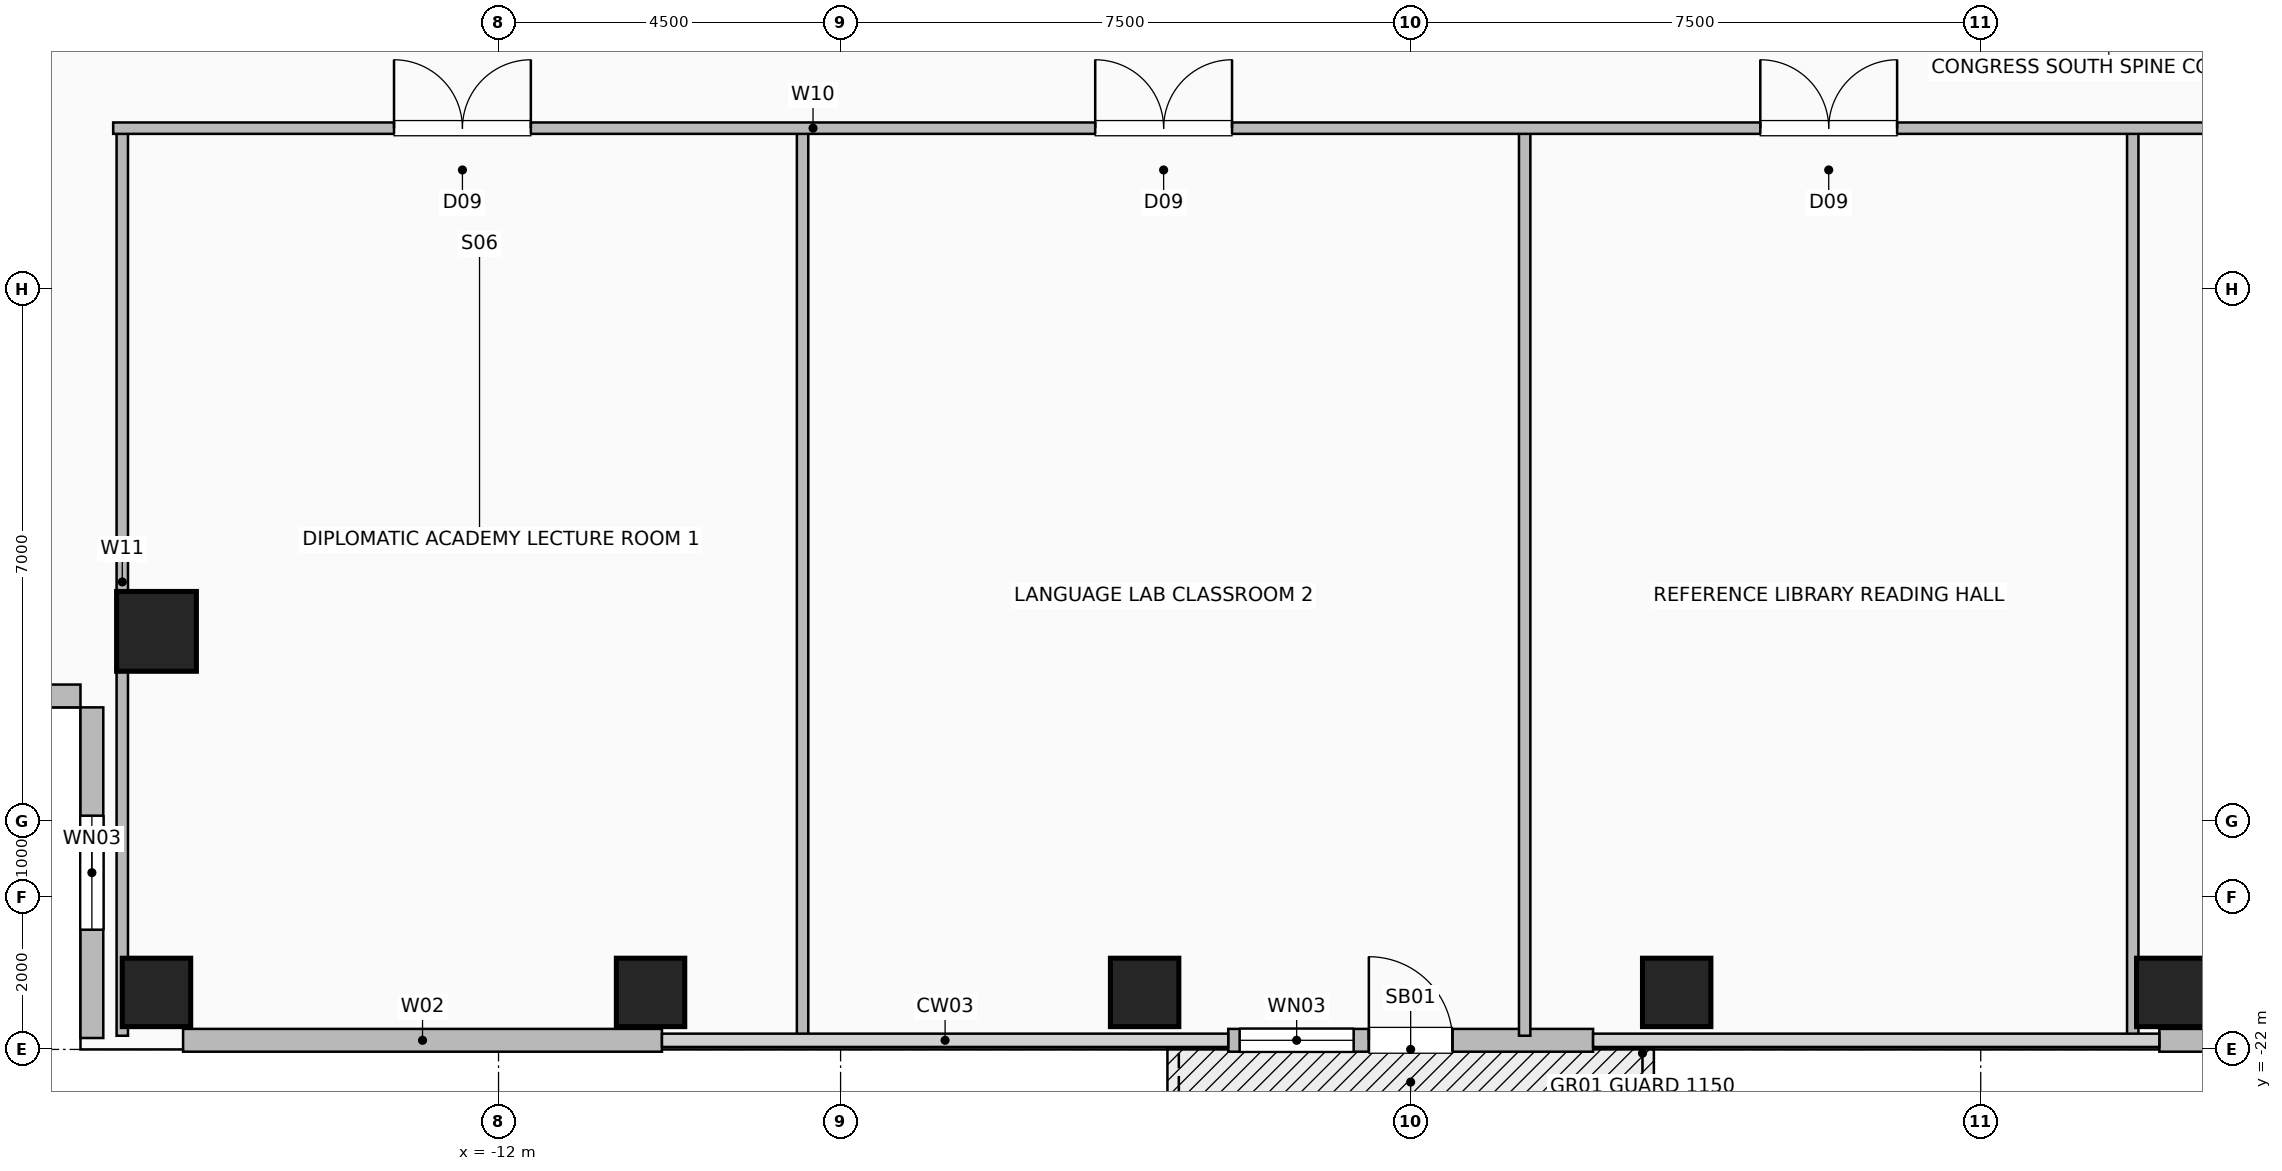
"""IFC4 building model, lengths in metres.
Left out: names, types, materials, properties, quantities, classifications, styles, units other than length and angle.
Written with IfcOpenShell. Run it as: python <this file> out.ifc"""

import sys

from ifc_helpers import new_model, si_unit, direction, frame, frame_2d, origin, origin_2d, place, context, subcontext, project, spatial, rectangle, hollow_rectangle, extrude, element, fill, save


model = new_model("IFC4")
c1 = context("Model", 3, precision=1e-05, world=origin(), true_north=direction((0.0, 1.0)))
c2 = subcontext(c1, "Body", "Model", "MODEL_VIEW")
j1 = project(units=[si_unit("LENGTHUNIT", "METRE"), si_unit("PLANEANGLEUNIT", "RADIAN")], contexts=[c1])
p1 = place(None, origin())
s1 = spatial("IfcSite", under=j1, at=p1, CompositionType="ELEMENT")
p2 = place(p1, origin())
s2 = spatial("IfcBuilding", under=s1, at=p2, CompositionType="ELEMENT")
p3 = place(p2, frame((0.0, 0.0, 133.6)))
s3 = spatial("IfcBuildingStorey", under=s2, at=p3, CompositionType="ELEMENT", Elevation=133.6)
for number, where, z_axis, x_axis in (
    (1, (-16.5, -21.25, 0.0), (0.0, 0.0, 1.0), (1.0, 0.0, 0.0)),
    (2, (-10.0, -21.25, 0.0), (0.0, 0.0, 1.0), (1.0, 0.0, 0.0)),
    (3, (-3.5, -21.25, 0.0), (0.0, 0.0, 1.0), (1.0, 0.0, 0.0)),
    (4, (3.5, -21.25, 0.0), (0.0, 0.0, 1.0), (1.0, 0.0, 0.0)),
    (5, (10.0, -21.25, 0.0), (0.0, 0.0, 1.0), (1.0, 0.0, 0.0)),
):
    element("IfcColumn", number, at=place(p3, frame(where, z_axis=z_axis, x_axis=x_axis)), inside=s3, PredefinedType="COLUMN", context=c2, shape_type="SweptSolid", body=[
        extrude(hollow_rectangle(XDim=0.9, YDim=0.9, WallThickness=0.045, at=origin_2d()), origin(), (0.0, 0.0, 1.0), 3.6),
    ])
p4 = place(p3, frame((-16.5, -16.5, 0.0), z_axis=(0.0, 0.0, 1.0), x_axis=(1.0, 0.0, 0.0)))
e6 = element("IfcColumn", 6, at=p4, inside=s3, PredefinedType="COLUMN", context=c2, shape_type="SweptSolid", body=[
    extrude(hollow_rectangle(XDim=1.05, YDim=1.05, WallThickness=0.05, at=origin_2d()), origin(), (0.0, 0.0, 1.0), 3.6),
])
for number, where, z_axis, x_axis in (
    (7, (-16.15, -21.88, 0.0), (0.0, 0.0, 1.0), (1.0, 0.0, 0.0)),
    (8, (9.85, -21.88, 0.0), (0.0, 0.0, 1.0), (1.0, 0.0, 0.0)),
):
    element("IfcWall", number, at=place(p3, frame(where, z_axis=z_axis, x_axis=x_axis)), inside=s3, PredefinedType="SOLIDWALL", context=c2, shape_type="SweptSolid", body=[
        extrude(rectangle(XDim=6.3, YDim=0.3, at=frame_2d((3.15, 0.0))), origin(), (0.0, 0.0, 1.0), 3.36),
    ])
p5 = place(p3, frame((-2.4, -21.88, 0.0), z_axis=(0.0, 0.0, 1.0), x_axis=(1.0, 0.0, 0.0)))
e9 = element("IfcWall", 9, at=p5, inside=s3, PredefinedType="SOLIDWALL", context=c2, shape_type="SweptSolid", body=[
    extrude(rectangle(XDim=4.8, YDim=0.3, at=frame_2d((2.4, 0.0))), origin(), (0.0, 0.0, 1.0), 3.36),
])
p6 = place(p5, frame((1.85, 0.0, 0.0)))
e10 = element("IfcOpeningElement", 10, at=p6, cuts=e9, PredefinedType="OPENING", context=c2, shape_type="SweptSolid", body=[
    extrude(rectangle(XDim=1.1, YDim=2.2, at=frame_2d((0.55, 1.1))), frame((0.0, 0.16, 0.0), z_axis=(0.0, -1.0, 0.0), x_axis=(1.0, 0.0, 0.0)), (0.0, 0.0, 1.0), 0.32),
])
p7 = place(p5, frame((0.15, 0.0, 0.85)))
e11 = element("IfcOpeningElement", 11, at=p7, cuts=e9, PredefinedType="OPENING", context=c2, shape_type="SweptSolid", body=[
    extrude(rectangle(XDim=1.5, YDim=1.8, at=frame_2d((0.75, 0.9))), frame((0.0, 0.16, 0.0), z_axis=(0.0, -1.0, 0.0), x_axis=(1.0, 0.0, 0.0)), (0.0, 0.0, 1.0), 0.32),
])
p8 = place(p3, frame((-17.35, -21.85, 0.0), z_axis=(0.0, 0.0, 1.0), x_axis=(0.0, 1.0, 0.0)))
e12 = element("IfcWall", 12, at=p8, inside=s3, PredefinedType="SOLIDWALL", context=c2, shape_type="SweptSolid", body=[
    extrude(rectangle(XDim=4.35, YDim=0.3, at=frame_2d((2.175, 0.0))), origin(), (0.0, 0.0, 1.0), 3.36),
])
p9 = place(p8, frame((1.425, 0.0, 0.9)))
e13 = element("IfcOpeningElement", 13, at=p9, cuts=e12, PredefinedType="OPENING", context=c2, shape_type="SweptSolid", body=[
    extrude(rectangle(XDim=1.5, YDim=1.8, at=frame_2d((0.75, 0.9))), frame((0.0, 0.16, 0.0), z_axis=(0.0, -1.0, 0.0), x_axis=(1.0, 0.0, 0.0)), (0.0, 0.0, 1.0), 0.32),
])
p10 = place(p3, frame((-21.85, -17.35, 0.0), z_axis=(0.0, 0.0, 1.0), x_axis=(1.0, 0.0, 0.0)))
e14 = element("IfcWall", 14, at=p10, inside=s3, PredefinedType="SOLIDWALL", context=c2, shape_type="SweptSolid", body=[
    extrude(rectangle(XDim=4.35, YDim=0.3, at=frame_2d((2.175, 0.0))), origin(), (0.0, 0.0, 1.0), 3.36),
])
for number, where, z_axis, x_axis in (
    (15, (-16.95, -21.82, 0.0), (0.0, 0.0, 1.0), (0.0, 1.0, 0.0)),
    (16, (-8.0, -21.82, 0.0), (0.0, 0.0, 1.0), (0.0, 1.0, 0.0)),
    (17, (1.5, -21.82, 0.0), (0.0, 0.0, 1.0), (0.0, 1.0, 0.0)),
    (18, (9.5, -21.82, 0.0), (0.0, 0.0, 1.0), (0.0, 1.0, 0.0)),
):
    element("IfcWall", number, at=place(p3, frame(where, z_axis=z_axis, x_axis=x_axis)), inside=s3, PredefinedType="PARTITIONING", context=c2, shape_type="SweptSolid", body=[
        extrude(rectangle(XDim=11.94, YDim=0.15, at=frame_2d((5.97, 0.0))), origin(), (0.0, 0.0, 1.0), 3.36),
    ])
p11 = place(p3, frame((-17.07, -9.88, 0.0), z_axis=(0.0, 0.0, 1.0), x_axis=(1.0, 0.0, 0.0)))
e19 = element("IfcWall", 19, at=p11, inside=s3, PredefinedType="PARTITIONING", context=c2, shape_type="SweptSolid", body=[
    extrude(rectangle(XDim=34.14, YDim=0.15, at=frame_2d((17.07, 0.0))), origin(), (0.0, 0.0, 1.0), 3.36),
])
p12 = place(p11, frame((3.695, 0.0, 0.0)))
e20 = element("IfcOpeningElement", 20, at=p12, cuts=e19, PredefinedType="OPENING", context=c2, shape_type="SweptSolid", body=[
    extrude(rectangle(XDim=1.8, YDim=2.08, at=frame_2d((0.9, 1.04))), frame((0.0, 0.085, 0.0), z_axis=(0.0, -1.0, 0.0), x_axis=(1.0, 0.0, 0.0)), (0.0, 0.0, 1.0), 0.17),
])
p13 = place(p11, frame((12.92, 0.0, 0.0)))
e21 = element("IfcOpeningElement", 21, at=p13, cuts=e19, PredefinedType="OPENING", context=c2, shape_type="SweptSolid", body=[
    extrude(rectangle(XDim=1.8, YDim=2.08, at=frame_2d((0.9, 1.04))), frame((0.0, 0.085, 0.0), z_axis=(0.0, -1.0, 0.0), x_axis=(1.0, 0.0, 0.0)), (0.0, 0.0, 1.0), 0.17),
])
p14 = place(p11, frame((21.67, 0.0, 0.0)))
e22 = element("IfcOpeningElement", 22, at=p14, cuts=e19, PredefinedType="OPENING", context=c2, shape_type="SweptSolid", body=[
    extrude(rectangle(XDim=1.8, YDim=2.08, at=frame_2d((0.9, 1.04))), frame((0.0, 0.085, 0.0), z_axis=(0.0, -1.0, 0.0), x_axis=(1.0, 0.0, 0.0)), (0.0, 0.0, 1.0), 0.17),
])
p15 = place(p11, frame((29.82, 0.0, 0.0)))
e23 = element("IfcOpeningElement", 23, at=p15, cuts=e19, PredefinedType="OPENING", context=c2, shape_type="SweptSolid", body=[
    extrude(rectangle(XDim=0.95, YDim=2.06, at=frame_2d((0.475, 1.03))), frame((0.0, 0.085, 0.0), z_axis=(0.0, -1.0, 0.0), x_axis=(1.0, 0.0, 0.0)), (0.0, 0.0, 1.0), 0.17),
])
p16 = place(p6, origin())
e24 = element("IfcDoor", 24, at=p16, inside=s3, OperationType="SINGLE_SWING_LEFT", PredefinedType="DOOR", context=c2, shape_type="SweptSolid", body=[
    extrude(rectangle(XDim=1.1, YDim=2.2, at=frame_2d((0.55, 1.1))), frame((0.0, 0.025, 0.0), z_axis=(0.0, -1.0, 0.0), x_axis=(1.0, 0.0, 0.0)), (0.0, 0.0, 1.0), 0.05),
])
fill(e10, e24)
p17 = place(p7, origin())
e25 = element("IfcWindow", 25, at=p17, inside=s3, PartitioningType="SINGLE_PANEL", PredefinedType="WINDOW", context=c2, shape_type="SweptSolid", body=[
    extrude(rectangle(XDim=1.5, YDim=1.8, at=frame_2d((0.75, 0.9))), frame((0.0, 0.03, 0.0), z_axis=(0.0, -1.0, 0.0), x_axis=(1.0, 0.0, 0.0)), (0.0, 0.0, 1.0), 0.06),
])
fill(e11, e25)
p18 = place(p9, origin())
e26 = element("IfcWindow", 26, at=p18, inside=s3, PartitioningType="SINGLE_PANEL", PredefinedType="WINDOW", context=c2, shape_type="SweptSolid", body=[
    extrude(rectangle(XDim=1.5, YDim=1.8, at=frame_2d((0.75, 0.9))), frame((0.0, 0.03, 0.0), z_axis=(0.0, -1.0, 0.0), x_axis=(1.0, 0.0, 0.0)), (0.0, 0.0, 1.0), 0.06),
])
fill(e13, e26)
p19 = place(p12, origin())
e27 = element("IfcDoor", 27, at=p19, inside=s3, OperationType="DOUBLE_DOOR_SINGLE_SWING", PredefinedType="DOOR", context=c2, shape_type="SweptSolid", body=[
    extrude(rectangle(XDim=1.8, YDim=2.08, at=frame_2d((0.9, 1.04))), frame((0.0, 0.025, 0.0), z_axis=(0.0, -1.0, 0.0), x_axis=(1.0, 0.0, 0.0)), (0.0, 0.0, 1.0), 0.05),
])
fill(e20, e27)
p20 = place(p13, origin())
e28 = element("IfcDoor", 28, at=p20, inside=s3, OperationType="DOUBLE_DOOR_SINGLE_SWING", PredefinedType="DOOR", context=c2, shape_type="SweptSolid", body=[
    extrude(rectangle(XDim=1.8, YDim=2.08, at=frame_2d((0.9, 1.04))), frame((0.0, 0.025, 0.0), z_axis=(0.0, -1.0, 0.0), x_axis=(1.0, 0.0, 0.0)), (0.0, 0.0, 1.0), 0.05),
])
fill(e21, e28)
p21 = place(p14, origin())
e29 = element("IfcDoor", 29, at=p21, inside=s3, OperationType="DOUBLE_DOOR_SINGLE_SWING", PredefinedType="DOOR", context=c2, shape_type="SweptSolid", body=[
    extrude(rectangle(XDim=1.8, YDim=2.08, at=frame_2d((0.9, 1.04))), frame((0.0, 0.025, 0.0), z_axis=(0.0, -1.0, 0.0), x_axis=(1.0, 0.0, 0.0)), (0.0, 0.0, 1.0), 0.05),
])
fill(e22, e29)
save(model, sys.argv[1])
